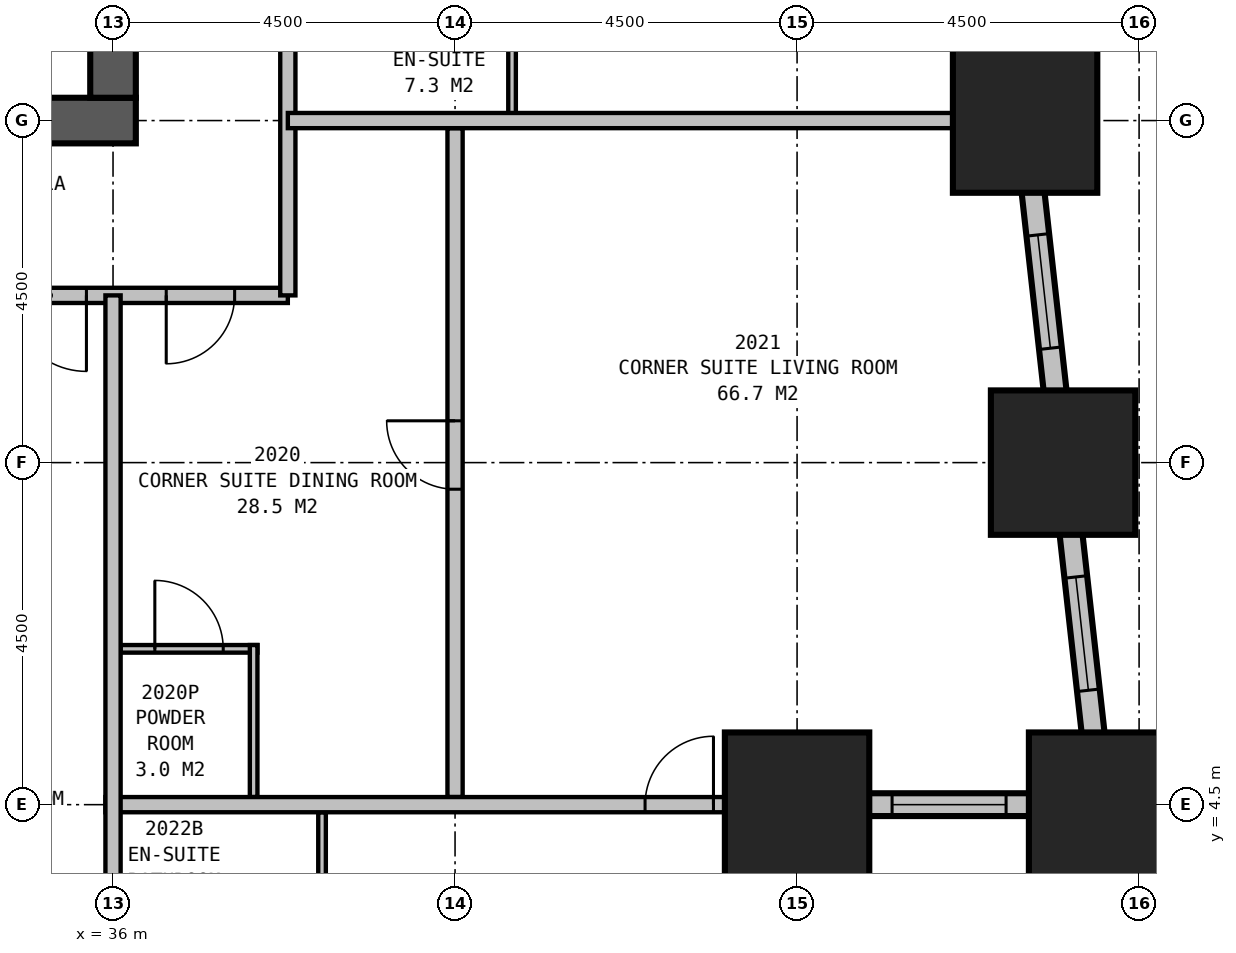
"""IFC4 building model, lengths in metres.
Left out: names, types, materials, properties, quantities, classifications, styles, units other than length and angle.
Written with IfcOpenShell. Run it as: python <this file> out.ifc"""

import sys

from ifc_helpers import new_model, si_unit, direction, frame, frame_2d, origin, origin_2d, place, context, subcontext, project, spatial, rectangle, extrude, element, fill, save


model = new_model("IFC4")
c1 = context("Model", 3, precision=1e-05, world=origin(), true_north=direction((0.0, 1.0)))
c2 = subcontext(c1, "Body", "Model", "MODEL_VIEW")
j1 = project(units=[si_unit("LENGTHUNIT", "METRE"), si_unit("PLANEANGLEUNIT", "RADIAN")], contexts=[c1])
p1 = place(None, origin())
s1 = spatial("IfcSite", under=j1, at=p1, CompositionType="ELEMENT")
p2 = place(p1, origin())
s2 = spatial("IfcBuilding", under=s1, at=p2, CompositionType="ELEMENT")
p3 = place(p2, frame((0.0, 0.0, 82.2)))
s3 = spatial("IfcBuildingStorey", under=s2, at=p3, CompositionType="ELEMENT", Elevation=82.2)
for number, where, z_axis, x_axis in (
    (1, (45.0, 4.5, 0.0), (0.0, 0.0, 1.0), (1.0, 0.0, 0.0)),
    (2, (49.0, 4.5, 0.0), (0.0, 0.0, 1.0), (1.0, 0.0, 0.0)),
    (3, (48.5, 9.0, 0.0), (0.0, 0.0, 1.0), (1.0, 0.0, 0.0)),
    (4, (48.0, 13.5, 0.0), (0.0, 0.0, 1.0), (1.0, 0.0, 0.0)),
):
    element("IfcColumn", number, at=place(p3, frame(where, z_axis=z_axis, x_axis=x_axis)), inside=s3, PredefinedType="COLUMN", context=c2, shape_type="SweptSolid", body=[
        extrude(rectangle(XDim=1.9, YDim=1.9, at=origin_2d()), origin(), (0.0, 0.0, 1.0), 3.5),
    ])
p4 = place(p3, frame((13.2, 13.5, 0.0), z_axis=(0.0, 0.0, 1.0), x_axis=(1.0, 0.0, 0.0)))
e5 = element("IfcWall", 5, at=p4, inside=s3, PredefinedType="SHEAR", context=c2, shape_type="SweptSolid", body=[
    extrude(rectangle(XDim=23.1, YDim=0.6, at=frame_2d((11.55, 0.0))), origin(), (0.0, 0.0, 1.0), 3.5),
])
p5 = place(p3, frame((36.0, 13.8, 0.0), z_axis=(0.0, 0.0, 1.0), x_axis=(0.0, 1.0, 0.0)))
e6 = element("IfcWall", 6, at=p5, inside=s3, PredefinedType="SHEAR", context=c2, shape_type="SweptSolid", body=[
    extrude(rectangle(XDim=2.7, YDim=0.6, at=frame_2d((1.35, 0.0))), origin(), (0.0, 0.0, 1.0), 3.5),
])
p6 = place(p3, frame((45.0, -0.15, 0.0), z_axis=(0.0, 0.0, 1.0), x_axis=(0.0, 1.0, 0.0)))
e7 = element("IfcWall", 7, at=p6, inside=s3, PredefinedType="STANDARD", context=c2, shape_type="SweptSolid", body=[
    extrude(rectangle(XDim=4.8, YDim=0.3, at=frame_2d((2.4, 0.0))), origin(), (0.0, 0.0, 1.0), 2.1),
])
p7 = place(p6, frame((1.65, 0.0, 0.5)))
e8 = element("IfcOpeningElement", 8, at=p7, cuts=e7, PredefinedType="OPENING", context=c2, shape_type="SweptSolid", body=[
    extrude(rectangle(XDim=1.5, YDim=1.4, at=frame_2d((0.75, 0.7))), frame((0.0, 0.16, 0.0), z_axis=(0.0, -1.0, 0.0), x_axis=(1.0, 0.0, 0.0)), (0.0, 0.0, 1.0), 0.32),
])
p8 = place(p3, frame((44.85, 4.5, 0.0), z_axis=(0.0, 0.0, 1.0), x_axis=(1.0, 0.0, 0.0)))
e9 = element("IfcWall", 9, at=p8, inside=s3, PredefinedType="STANDARD", context=c2, shape_type="SweptSolid", body=[
    extrude(rectangle(XDim=4.3, YDim=0.3, at=frame_2d((2.15, 0.0))), origin(), (0.0, 0.0, 1.0), 2.1),
])
p9 = place(p8, frame((1.4, 0.0, 0.5)))
e10 = element("IfcOpeningElement", 10, at=p9, cuts=e9, PredefinedType="OPENING", context=c2, shape_type="SweptSolid", body=[
    extrude(rectangle(XDim=1.5, YDim=1.4, at=frame_2d((0.75, 0.7))), frame((0.0, 0.16, 0.0), z_axis=(0.0, -1.0, 0.0), x_axis=(1.0, 0.0, 0.0)), (0.0, 0.0, 1.0), 0.32),
])
p10 = place(p3, frame((49.017, 4.351, 0.0), z_axis=(0.0, 0.0, 1.0), x_axis=(-0.110433201132, 0.993883548555, 0.0)))
e11 = element("IfcWall", 11, at=p10, inside=s3, PredefinedType="STANDARD", context=c2, shape_type="SweptSolid", body=[
    extrude(rectangle(XDim=31.994, YDim=0.3, at=frame_2d((15.997, 0.0))), origin(), (0.0, 0.0, 1.0), 2.1),
])
p11 = place(p10, frame((1.664, 0.0, 0.5)))
e12 = element("IfcOpeningElement", 12, at=p11, cuts=e11, PredefinedType="OPENING", context=c2, shape_type="SweptSolid", body=[
    extrude(rectangle(XDim=1.5, YDim=1.4, at=frame_2d((0.75, 0.7))), frame((0.0, 0.16, 0.0), z_axis=(0.0, -1.0, 0.0), x_axis=(1.0, 0.0, 0.0)), (0.0, 0.0, 1.0), 0.32),
])
p12 = place(p10, frame((6.192, 0.0, 0.5)))
e13 = element("IfcOpeningElement", 13, at=p12, cuts=e11, PredefinedType="OPENING", context=c2, shape_type="SweptSolid", body=[
    extrude(rectangle(XDim=1.5, YDim=1.4, at=frame_2d((0.75, 0.7))), frame((0.0, 0.16, 0.0), z_axis=(0.0, -1.0, 0.0), x_axis=(1.0, 0.0, 0.0)), (0.0, 0.0, 1.0), 0.32),
])
p13 = place(p10, frame((10.719, 0.0, 0.5)))
e14 = element("IfcOpeningElement", 14, at=p13, cuts=e11, PredefinedType="OPENING", context=c2, shape_type="SweptSolid", body=[
    extrude(rectangle(XDim=1.5, YDim=1.4, at=frame_2d((0.75, 0.7))), frame((0.0, 0.16, 0.0), z_axis=(0.0, -1.0, 0.0), x_axis=(1.0, 0.0, 0.0)), (0.0, 0.0, 1.0), 0.32),
])
p14 = place(p10, frame((15.247, 0.0, 0.5)))
e15 = element("IfcOpeningElement", 15, at=p14, cuts=e11, PredefinedType="OPENING", context=c2, shape_type="SweptSolid", body=[
    extrude(rectangle(XDim=1.5, YDim=1.4, at=frame_2d((0.75, 0.7))), frame((0.0, 0.16, 0.0), z_axis=(0.0, -1.0, 0.0), x_axis=(1.0, 0.0, 0.0)), (0.0, 0.0, 1.0), 0.32),
])
p15 = place(p10, frame((19.775, 0.0, 0.5)))
e16 = element("IfcOpeningElement", 16, at=p15, cuts=e11, PredefinedType="OPENING", context=c2, shape_type="SweptSolid", body=[
    extrude(rectangle(XDim=1.5, YDim=1.4, at=frame_2d((0.75, 0.7))), frame((0.0, 0.16, 0.0), z_axis=(0.0, -1.0, 0.0), x_axis=(1.0, 0.0, 0.0)), (0.0, 0.0, 1.0), 0.32),
])
p16 = place(p10, frame((24.302, 0.0, 0.5)))
e17 = element("IfcOpeningElement", 17, at=p16, cuts=e11, PredefinedType="OPENING", context=c2, shape_type="SweptSolid", body=[
    extrude(rectangle(XDim=1.5, YDim=1.4, at=frame_2d((0.75, 0.7))), frame((0.0, 0.16, 0.0), z_axis=(0.0, -1.0, 0.0), x_axis=(1.0, 0.0, 0.0)), (0.0, 0.0, 1.0), 0.32),
])
p17 = place(p10, frame((28.83, 0.0, 0.5)))
e18 = element("IfcOpeningElement", 18, at=p17, cuts=e11, PredefinedType="OPENING", context=c2, shape_type="SweptSolid", body=[
    extrude(rectangle(XDim=1.5, YDim=1.4, at=frame_2d((0.75, 0.7))), frame((0.0, 0.16, 0.0), z_axis=(0.0, -1.0, 0.0), x_axis=(1.0, 0.0, 0.0)), (0.0, 0.0, 1.0), 0.32),
])
p18 = place(p3, frame((11.2, 11.2, 0.0), z_axis=(0.0, 0.0, 1.0), x_axis=(1.0, 0.0, 0.0)))
e19 = element("IfcWall", 19, at=p18, inside=s3, PredefinedType="PARTITIONING", context=c2, shape_type="SweptSolid", body=[
    extrude(rectangle(XDim=27.1, YDim=0.2, at=frame_2d((13.55, 0.0))), origin(), (0.0, 0.0, 1.0), 3.25),
])
p19 = place(p18, frame((6.45, 0.0, 0.0), z_axis=(0.0, 0.0, 1.0), x_axis=(-1.0, 0.0, 0.0)))
e20 = element("IfcOpeningElement", 20, at=p19, cuts=e19, PredefinedType="OPENING", context=c2, shape_type="SweptSolid", body=[
    extrude(rectangle(XDim=1.0, YDim=2.1, at=frame_2d((0.5, 1.05))), frame((0.0, 0.11, 0.0), z_axis=(0.0, -1.0, 0.0), x_axis=(1.0, 0.0, 0.0)), (0.0, 0.0, 1.0), 0.22),
])
p20 = place(p18, frame((9.55, 0.0, 0.0), z_axis=(0.0, 0.0, 1.0), x_axis=(-1.0, 0.0, 0.0)))
e21 = element("IfcOpeningElement", 21, at=p20, cuts=e19, PredefinedType="OPENING", context=c2, shape_type="SweptSolid", body=[
    extrude(rectangle(XDim=0.9, YDim=2.1, at=frame_2d((0.45, 1.05))), frame((0.0, 0.11, 0.0), z_axis=(0.0, -1.0, 0.0), x_axis=(1.0, 0.0, 0.0)), (0.0, 0.0, 1.0), 0.22),
])
p21 = place(p18, frame((15.95, 0.0, 0.0), z_axis=(0.0, 0.0, 1.0), x_axis=(-1.0, 0.0, 0.0)))
e22 = element("IfcOpeningElement", 22, at=p21, cuts=e19, PredefinedType="OPENING", context=c2, shape_type="SweptSolid", body=[
    extrude(rectangle(XDim=0.9, YDim=2.1, at=frame_2d((0.45, 1.05))), frame((0.0, 0.11, 0.0), z_axis=(0.0, -1.0, 0.0), x_axis=(1.0, 0.0, 0.0)), (0.0, 0.0, 1.0), 0.22),
])
p22 = place(p18, frame((20.0, 0.0, 0.0), z_axis=(0.0, 0.0, 1.0), x_axis=(-1.0, 0.0, 0.0)))
e23 = element("IfcOpeningElement", 23, at=p22, cuts=e19, PredefinedType="OPENING", context=c2, shape_type="SweptSolid", body=[
    extrude(rectangle(XDim=0.9, YDim=2.1, at=frame_2d((0.45, 1.05))), frame((0.0, 0.11, 0.0), z_axis=(0.0, -1.0, 0.0), x_axis=(1.0, 0.0, 0.0)), (0.0, 0.0, 1.0), 0.22),
])
p23 = place(p18, frame((24.45, 0.0, 0.0), z_axis=(0.0, 0.0, 1.0), x_axis=(-1.0, 0.0, 0.0)))
e24 = element("IfcOpeningElement", 24, at=p23, cuts=e19, PredefinedType="OPENING", context=c2, shape_type="SweptSolid", body=[
    extrude(rectangle(XDim=1.0, YDim=2.1, at=frame_2d((0.5, 1.05))), frame((0.0, 0.11, 0.0), z_axis=(0.0, -1.0, 0.0), x_axis=(1.0, 0.0, 0.0)), (0.0, 0.0, 1.0), 0.22),
])
p24 = place(p18, frame((1.6, 0.0, 0.0), z_axis=(0.0, 0.0, 1.0), x_axis=(-1.0, 0.0, 0.0)))
e25 = element("IfcOpeningElement", 25, at=p24, cuts=e19, PredefinedType="OPENING", context=c2, shape_type="SweptSolid", body=[
    extrude(rectangle(XDim=0.9, YDim=2.1, at=frame_2d((0.45, 1.05))), frame((0.0, 0.11, 0.0), z_axis=(0.0, -1.0, 0.0), x_axis=(1.0, 0.0, 0.0)), (0.0, 0.0, 1.0), 0.22),
])
p25 = place(p18, frame((26.4, 0.0, 0.0), z_axis=(0.0, 0.0, 1.0), x_axis=(-1.0, 0.0, 0.0)))
e26 = element("IfcOpeningElement", 26, at=p25, cuts=e19, PredefinedType="OPENING", context=c2, shape_type="SweptSolid", body=[
    extrude(rectangle(XDim=0.9, YDim=2.1, at=frame_2d((0.45, 1.05))), frame((0.0, 0.11, 0.0), z_axis=(0.0, -1.0, 0.0), x_axis=(1.0, 0.0, 0.0)), (0.0, 0.0, 1.0), 0.22),
])
p26 = place(p3, frame((38.3, 11.2, 0.0), z_axis=(0.0, 0.0, 1.0), x_axis=(0.0, 1.0, 0.0)))
e27 = element("IfcWall", 27, at=p26, inside=s3, PredefinedType="PARTITIONING", context=c2, shape_type="SweptSolid", body=[
    extrude(rectangle(XDim=18.7, YDim=0.2, at=frame_2d((9.35, 0.0))), origin(), (0.0, 0.0, 1.0), 3.25),
])
p27 = place(p26, frame((6.45, 0.0, 0.0), z_axis=(0.0, 0.0, 1.0), x_axis=(-1.0, 0.0, 0.0)))
e28 = element("IfcOpeningElement", 28, at=p27, cuts=e27, PredefinedType="OPENING", context=c2, shape_type="SweptSolid", body=[
    extrude(rectangle(XDim=1.0, YDim=2.1, at=frame_2d((0.5, 1.05))), frame((0.0, 0.11, 0.0), z_axis=(0.0, -1.0, 0.0), x_axis=(1.0, 0.0, 0.0)), (0.0, 0.0, 1.0), 0.22),
])
p28 = place(p26, frame((8.0, 0.0, 0.0), z_axis=(0.0, 0.0, 1.0), x_axis=(-1.0, 0.0, 0.0)))
e29 = element("IfcOpeningElement", 29, at=p28, cuts=e27, PredefinedType="OPENING", context=c2, shape_type="SweptSolid", body=[
    extrude(rectangle(XDim=0.9, YDim=2.1, at=frame_2d((0.45, 1.05))), frame((0.0, 0.11, 0.0), z_axis=(0.0, -1.0, 0.0), x_axis=(1.0, 0.0, 0.0)), (0.0, 0.0, 1.0), 0.22),
])
p29 = place(p3, frame((41.25, 13.5, 0.0), z_axis=(0.0, 0.0, 1.0), x_axis=(0.0, 1.0, 0.0)))
e30 = element("IfcWall", 30, at=p29, inside=s3, PredefinedType="PLUMBINGWALL", context=c2, shape_type="SweptSolid", body=[
    extrude(rectangle(XDim=2.8, YDim=0.1, at=frame_2d((1.4, 0.0))), origin(), (0.0, 0.0, 1.0), 3.25),
])
p30 = place(p3, frame((38.3, 13.5, 0.0), z_axis=(0.0, 0.0, 1.0), x_axis=(1.0, 0.0, 0.0)))
e31 = element("IfcWall", 31, at=p30, inside=s3, PredefinedType="PARTITIONING", context=c2, shape_type="SweptSolid", body=[
    extrude(rectangle(XDim=9.921, YDim=0.2, at=frame_2d((4.96, 0.0))), origin(), (0.0, 0.0, 1.0), 1.9),
])
p31 = place(p3, frame((36.0, 11.2, 0.0), z_axis=(0.0, 0.0, 1.0), x_axis=(0.0, -1.0, 0.0)))
e32 = element("IfcWall", 32, at=p31, inside=s3, PredefinedType="PARTITIONING", context=c2, shape_type="SweptSolid", body=[
    extrude(rectangle(XDim=11.2, YDim=0.2, at=frame_2d((5.6, 0.0))), origin(), (0.0, 0.0, 1.0), 2.2),
])
p32 = place(p3, frame((35.9, 4.5, 0.0), z_axis=(0.0, 0.0, 1.0), x_axis=(1.0, 0.0, 0.0)))
e33 = element("IfcWall", 33, at=p32, inside=s3, PredefinedType="PARTITIONING", context=c2, shape_type="SweptSolid", body=[
    extrude(rectangle(XDim=9.1, YDim=0.2, at=frame_2d((4.55, 0.0))), origin(), (0.0, 0.0, 1.0), 3.25),
])
p33 = place(p32, frame((7.1, 0.0, 0.0)))
e34 = element("IfcOpeningElement", 34, at=p33, cuts=e33, PredefinedType="OPENING", context=c2, shape_type="SweptSolid", body=[
    extrude(rectangle(XDim=0.9, YDim=2.1, at=frame_2d((0.45, 1.05))), frame((0.0, 0.11, 0.0), z_axis=(0.0, -1.0, 0.0), x_axis=(1.0, 0.0, 0.0)), (0.0, 0.0, 1.0), 0.22),
])
p34 = place(p3, frame((40.5, 4.6, 0.0), z_axis=(0.0, 0.0, 1.0), x_axis=(0.0, 1.0, 0.0)))
e35 = element("IfcWall", 35, at=p34, inside=s3, PredefinedType="PARTITIONING", context=c2, shape_type="SweptSolid", body=[
    extrude(rectangle(XDim=8.8, YDim=0.2, at=frame_2d((4.4, 0.0))), origin(), (0.0, 0.0, 1.0), 2.2),
])
p35 = place(p34, frame((4.05, 0.0, 0.0)))
e36 = element("IfcOpeningElement", 36, at=p35, cuts=e35, PredefinedType="OPENING", context=c2, shape_type="SweptSolid", body=[
    extrude(rectangle(XDim=0.9, YDim=2.1, at=frame_2d((0.45, 1.05))), frame((0.0, 0.11, 0.0), z_axis=(0.0, -1.0, 0.0), x_axis=(1.0, 0.0, 0.0)), (0.0, 0.0, 1.0), 0.22),
])
p36 = place(p3, frame((37.85, 4.6, 0.0), z_axis=(0.0, 0.0, 1.0), x_axis=(0.0, 1.0, 0.0)))
e37 = element("IfcWall", 37, at=p36, inside=s3, PredefinedType="PLUMBINGWALL", context=c2, shape_type="SweptSolid", body=[
    extrude(rectangle(XDim=2.0, YDim=0.1, at=frame_2d((1.0, 0.0))), origin(), (0.0, 0.0, 1.0), 3.25),
])
p37 = place(p3, frame((36.1, 6.55, 0.0), z_axis=(0.0, 0.0, 1.0), x_axis=(1.0, 0.0, 0.0)))
e38 = element("IfcWall", 38, at=p37, inside=s3, PredefinedType="PLUMBINGWALL", context=c2, shape_type="SweptSolid", body=[
    extrude(rectangle(XDim=1.8, YDim=0.1, at=frame_2d((0.9, 0.0))), origin(), (0.0, 0.0, 1.0), 3.25),
])
p38 = place(p37, frame((0.45, 0.0, 0.0)))
e39 = element("IfcOpeningElement", 39, at=p38, cuts=e38, PredefinedType="OPENING", context=c2, shape_type="SweptSolid", body=[
    extrude(rectangle(XDim=0.9, YDim=2.1, at=frame_2d((0.45, 1.05))), frame((0.0, 0.06, 0.0), z_axis=(0.0, -1.0, 0.0), x_axis=(1.0, 0.0, 0.0)), (0.0, 0.0, 1.0), 0.12),
])
p39 = place(p3, frame((38.75, 4.4, 0.0), z_axis=(0.0, 0.0, 1.0), x_axis=(0.0, -1.0, 0.0)))
e40 = element("IfcWall", 40, at=p39, inside=s3, PredefinedType="PLUMBINGWALL", context=c2, shape_type="SweptSolid", body=[
    extrude(rectangle(XDim=2.3, YDim=0.1, at=frame_2d((1.15, 0.0))), origin(), (0.0, 0.0, 1.0), 3.25),
])
p40 = place(p9, origin())
e41 = element("IfcWindow", 41, at=p40, inside=s3, PartitioningType="SINGLE_PANEL", PredefinedType="WINDOW", context=c2, shape_type="SweptSolid", body=[
    extrude(rectangle(XDim=1.5, YDim=1.4, at=frame_2d((0.75, 0.7))), frame((0.0, 0.03, 0.0), z_axis=(0.0, -1.0, 0.0), x_axis=(1.0, 0.0, 0.0)), (0.0, 0.0, 1.0), 0.06),
])
fill(e10, e41)
p41 = place(p11, origin())
e42 = element("IfcWindow", 42, at=p41, inside=s3, PartitioningType="SINGLE_PANEL", PredefinedType="WINDOW", context=c2, shape_type="SweptSolid", body=[
    extrude(rectangle(XDim=1.5, YDim=1.4, at=frame_2d((0.75, 0.7))), frame((0.0, 0.03, 0.0), z_axis=(0.0, -1.0, 0.0), x_axis=(1.0, 0.0, 0.0)), (0.0, 0.0, 1.0), 0.06),
])
fill(e12, e42)
p42 = place(p12, origin())
e43 = element("IfcWindow", 43, at=p42, inside=s3, PartitioningType="SINGLE_PANEL", PredefinedType="WINDOW", context=c2, shape_type="SweptSolid", body=[
    extrude(rectangle(XDim=1.5, YDim=1.4, at=frame_2d((0.75, 0.7))), frame((0.0, 0.03, 0.0), z_axis=(0.0, -1.0, 0.0), x_axis=(1.0, 0.0, 0.0)), (0.0, 0.0, 1.0), 0.06),
])
fill(e13, e43)
p43 = place(p23, origin())
e44 = element("IfcDoor", 44, at=p43, inside=s3, OperationType="SINGLE_SWING_LEFT", PredefinedType="DOOR", context=c2, shape_type="SweptSolid", body=[
    extrude(rectangle(XDim=1.0, YDim=2.1, at=frame_2d((0.5, 1.05))), frame((0.0, 0.025, 0.0), z_axis=(0.0, -1.0, 0.0), x_axis=(1.0, 0.0, 0.0)), (0.0, 0.0, 1.0), 0.05),
])
fill(e24, e44)
p44 = place(p25, origin())
e45 = element("IfcDoor", 45, at=p44, inside=s3, OperationType="SINGLE_SWING_RIGHT", PredefinedType="DOOR", context=c2, shape_type="SweptSolid", body=[
    extrude(rectangle(XDim=0.9, YDim=2.1, at=frame_2d((0.45, 1.05))), frame((0.0, 0.025, 0.0), z_axis=(0.0, -1.0, 0.0), x_axis=(1.0, 0.0, 0.0)), (0.0, 0.0, 1.0), 0.05),
])
fill(e26, e45)
p45 = place(p33, origin())
e46 = element("IfcDoor", 46, at=p45, inside=s3, OperationType="SINGLE_SWING_RIGHT", PredefinedType="DOOR", context=c2, shape_type="SweptSolid", body=[
    extrude(rectangle(XDim=0.9, YDim=2.1, at=frame_2d((0.45, 1.05))), frame((0.0, 0.025, 0.0), z_axis=(0.0, -1.0, 0.0), x_axis=(1.0, 0.0, 0.0)), (0.0, 0.0, 1.0), 0.05),
])
fill(e34, e46)
p46 = place(p35, origin())
e47 = element("IfcDoor", 47, at=p46, inside=s3, OperationType="SINGLE_SWING_RIGHT", PredefinedType="DOOR", context=c2, shape_type="SweptSolid", body=[
    extrude(rectangle(XDim=0.9, YDim=2.1, at=frame_2d((0.45, 1.05))), frame((0.0, 0.025, 0.0), z_axis=(0.0, -1.0, 0.0), x_axis=(1.0, 0.0, 0.0)), (0.0, 0.0, 1.0), 0.05),
])
fill(e36, e47)
p47 = place(p38, origin())
e48 = element("IfcDoor", 48, at=p47, inside=s3, OperationType="SINGLE_SWING_LEFT", PredefinedType="DOOR", context=c2, shape_type="SweptSolid", body=[
    extrude(rectangle(XDim=0.9, YDim=2.1, at=frame_2d((0.45, 1.05))), frame((0.0, 0.025, 0.0), z_axis=(0.0, -1.0, 0.0), x_axis=(1.0, 0.0, 0.0)), (0.0, 0.0, 1.0), 0.05),
])
fill(e39, e48)
save(model, sys.argv[1])
